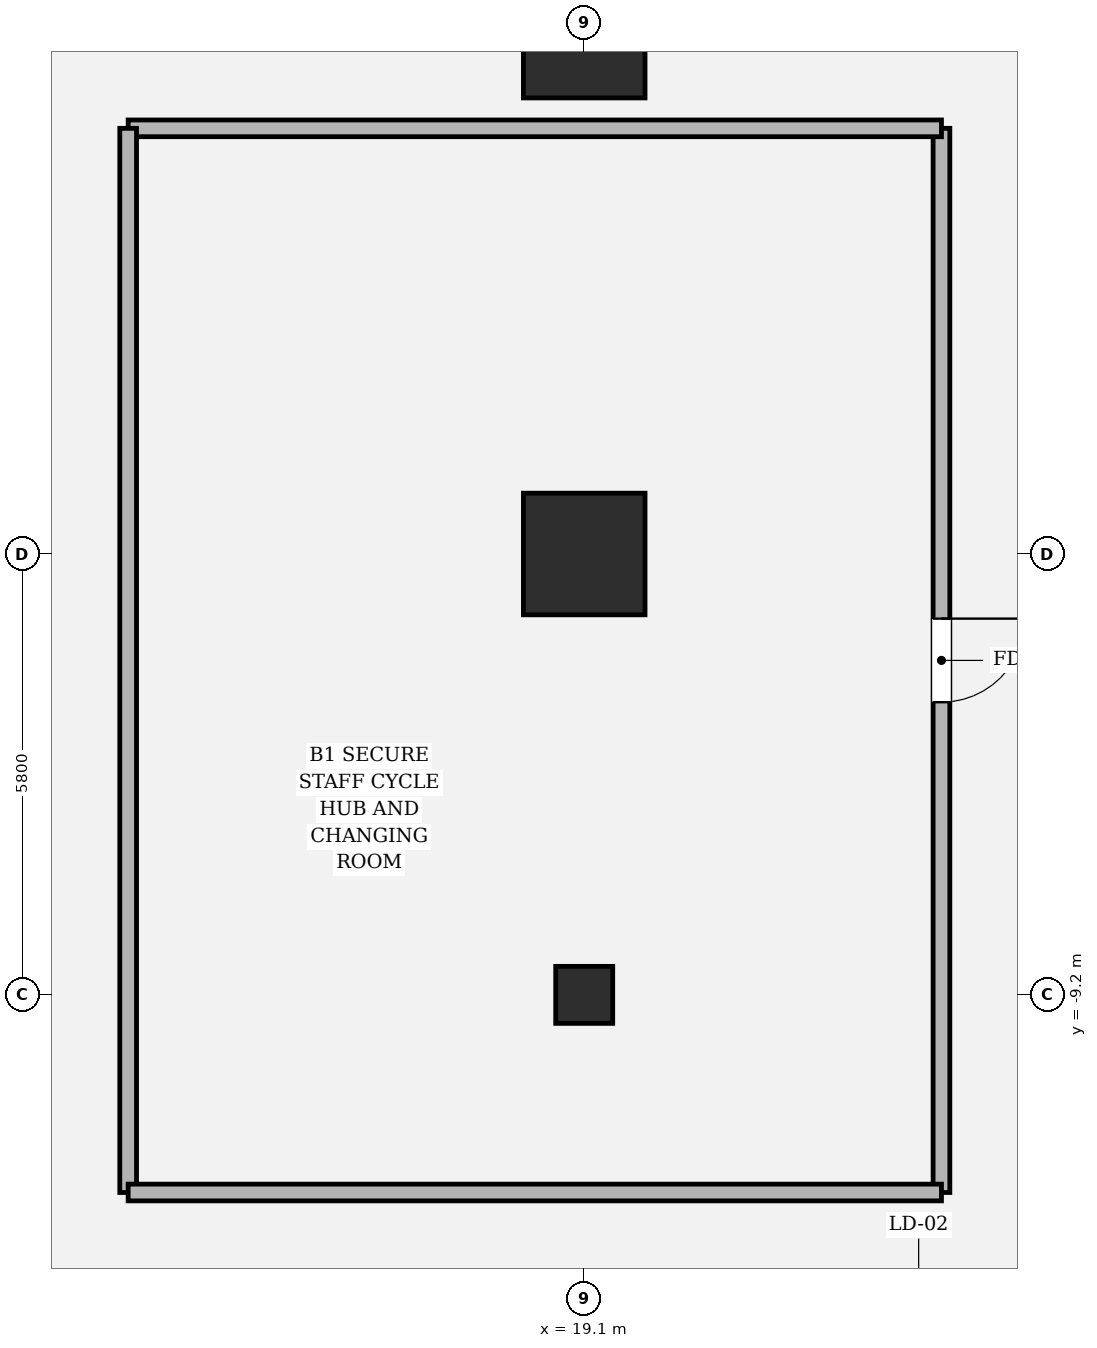
"""IFC4 building model, lengths in metres.
Left out: names, types, materials, properties, quantities, classifications, styles, units other than length and angle.
Written with IfcOpenShell. Run it as: python <this file> out.ifc"""

import sys

from ifc_helpers import new_model, si_unit, direction, frame, frame_2d, origin, origin_2d, place, context, subcontext, project, spatial, rectangle, hollow_rectangle, circle, extrude, element, fill, save


model = new_model("IFC4")
c1 = context("Model", 3, precision=1e-05, world=origin(), true_north=direction((0.0, 1.0)))
c2 = subcontext(c1, "Body", "Model", "MODEL_VIEW")
j1 = project(units=[si_unit("LENGTHUNIT", "METRE"), si_unit("PLANEANGLEUNIT", "RADIAN")], contexts=[c1])
p1 = place(None, origin())
s1 = spatial("IfcSite", under=j1, at=p1, CompositionType="ELEMENT")
p2 = place(p1, origin())
s2 = spatial("IfcBuilding", under=s1, at=p2, CompositionType="ELEMENT")
p3 = place(p2, frame((0.0, 0.0, -4.8)))
s3 = spatial("IfcBuildingStorey", under=s2, at=p3, CompositionType="ELEMENT", Elevation=-4.8)
for number, where, z_axis, x_axis in (
    (1, (19.1, -3.4, 0.0), (0.0, 0.0, 1.0), (1.0, 0.0, 0.0)),
    (2, (19.1, 3.4, 0.0), (0.0, 0.0, 1.0), (1.0, 0.0, 0.0)),
):
    element("IfcColumn", number, at=place(p3, frame(where, z_axis=z_axis, x_axis=x_axis)), inside=s3, PredefinedType="COLUMN", context=c2, shape_type="SweptSolid", body=[
        extrude(hollow_rectangle(XDim=1.6, YDim=1.6, WallThickness=0.05, at=origin_2d()), origin(), (0.0, 0.0, 1.0), 4.8),
    ])
p4 = place(p3, frame((19.1, -9.2, 0.0), z_axis=(0.0, 0.0, 1.0), x_axis=(1.0, 0.0, 0.0)))
e3 = element("IfcColumn", 3, at=p4, inside=s3, PredefinedType="PILASTER", context=c2, shape_type="SweptSolid", body=[
    extrude(circle(Radius=0.375, at=origin_2d()), origin(), (0.0, 0.0, 1.0), 4.8),
])
p5 = place(p3, frame((23.8, -11.8, 0.0), z_axis=(0.0, 0.0, 1.0), x_axis=(0.0, 1.0, 0.0)))
e4 = element("IfcWall", 4, at=p5, inside=s3, PredefinedType="SOLIDWALL", context=c2, shape_type="SweptSolid", body=[
    extrude(rectangle(XDim=14.0, YDim=0.22, at=frame_2d((7.0, 0.0))), origin(), (0.0, 0.0, 1.0), 3.814),
])
p6 = place(p5, frame((6.45, 0.0, 0.0)))
e5 = element("IfcOpeningElement", 5, at=p6, cuts=e4, PredefinedType="OPENING", context=c2, shape_type="SweptSolid", body=[
    extrude(rectangle(XDim=1.1, YDim=2.2, at=frame_2d((0.55, 1.1))), frame((0.0, 0.12, 0.0), z_axis=(0.0, -1.0, 0.0), x_axis=(1.0, 0.0, 0.0)), (0.0, 0.0, 1.0), 0.24),
])
p7 = place(p3, frame((23.8, 2.2, 0.0), z_axis=(0.0, 0.0, 1.0), x_axis=(-1.0, 0.0, 0.0)))
e6 = element("IfcWall", 6, at=p7, inside=s3, PredefinedType="SOLIDWALL", context=c2, shape_type="SweptSolid", body=[
    extrude(rectangle(XDim=10.7, YDim=0.22, at=frame_2d((5.35, 0.0))), origin(), (0.0, 0.0, 1.0), 3.814),
])
p8 = place(p3, frame((13.1, 2.2, 0.0), z_axis=(0.0, 0.0, 1.0), x_axis=(0.0, -1.0, 0.0)))
e7 = element("IfcWall", 7, at=p8, inside=s3, PredefinedType="SOLIDWALL", context=c2, shape_type="SweptSolid", body=[
    extrude(rectangle(XDim=14.0, YDim=0.22, at=frame_2d((7.0, 0.0))), origin(), (0.0, 0.0, 1.0), 3.814),
])
p9 = place(p3, frame((13.1, -11.8, 0.0), z_axis=(0.0, 0.0, 1.0), x_axis=(1.0, 0.0, 0.0)))
e8 = element("IfcWall", 8, at=p9, inside=s3, PredefinedType="SOLIDWALL", context=c2, shape_type="SweptSolid", body=[
    extrude(rectangle(XDim=10.7, YDim=0.22, at=frame_2d((5.35, 0.0))), origin(), (0.0, 0.0, 1.0), 3.814),
])
p10 = place(p6, origin())
e9 = element("IfcDoor", 9, at=p10, inside=s3, OperationType="SINGLE_SWING_RIGHT", PredefinedType="DOOR", context=c2, shape_type="SweptSolid", body=[
    extrude(rectangle(XDim=1.1, YDim=2.2, at=frame_2d((0.55, 1.1))), frame((0.0, 0.025, 0.0), z_axis=(0.0, -1.0, 0.0), x_axis=(1.0, 0.0, 0.0)), (0.0, 0.0, 1.0), 0.05),
])
fill(e5, e9)
save(model, sys.argv[1])
